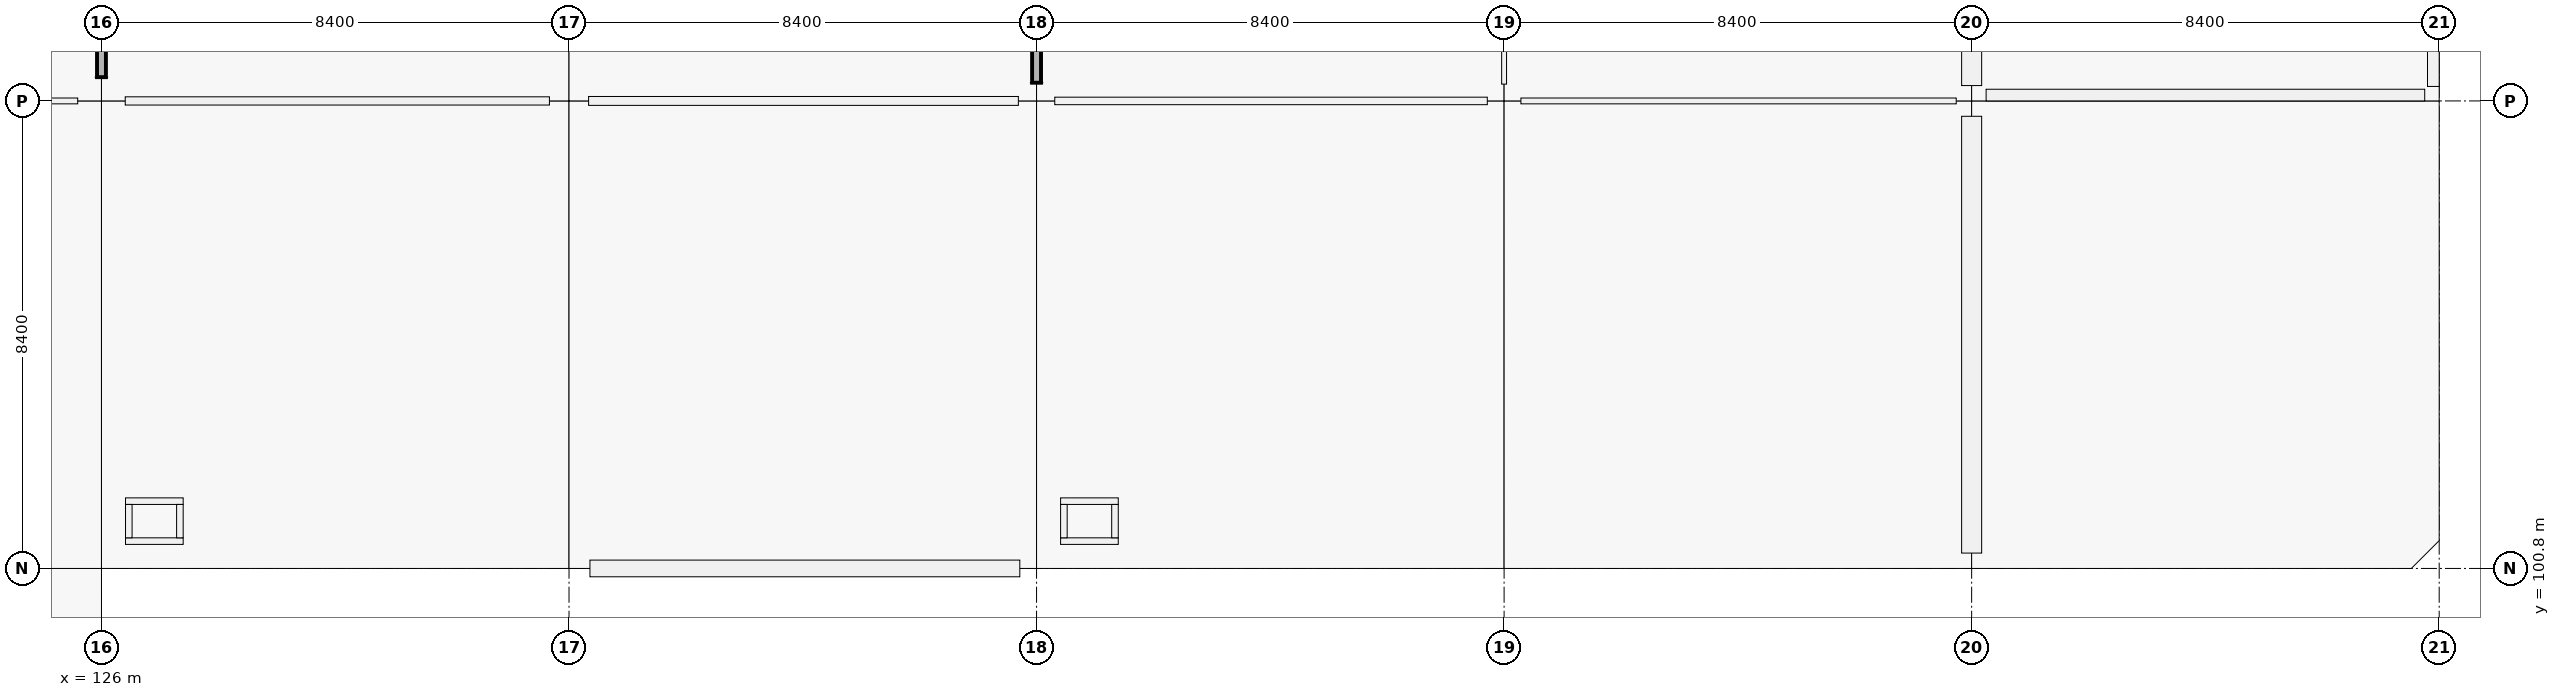
"""IFC4 building model, lengths in metres.
Left out: names, types, materials, properties, quantities, classifications, styles, units other than length and angle.
Written with IfcOpenShell. Run it as: python <this file> out.ifc"""

import sys

from ifc_helpers import new_model, si_unit, direction, frame, frame_2d, origin, origin_2d, place, context, subcontext, project, spatial, rectangle, extrude, element, fill, save


model = new_model("IFC4")
c1 = context("Model", 3, precision=1e-05, world=origin(), true_north=direction((0.0, 1.0)))
c2 = subcontext(c1, "Body", "Model", "MODEL_VIEW")
j1 = project(units=[si_unit("LENGTHUNIT", "METRE"), si_unit("PLANEANGLEUNIT", "RADIAN")], contexts=[c1])
p1 = place(None, origin())
s1 = spatial("IfcSite", under=j1, at=p1, CompositionType="ELEMENT")
p2 = place(p1, origin())
s2 = spatial("IfcBuilding", under=s1, at=p2, CompositionType="ELEMENT")
p3 = place(p2, frame((0.0, 0.0, 10.26)))
s3 = spatial("IfcBuildingStorey", under=s2, at=p3, CompositionType="ELEMENT", Elevation=10.26)
for number, where, z_axis, x_axis in (
    (1, (126.0, 100.8, 0.0), (0.0, 0.0, 1.0), (1.0, 0.0, 0.0)),
    (2, (126.0, 109.2, 0.0), (0.0, 0.0, 1.0), (1.0, 0.0, 0.0)),
):
    element("IfcColumn", number, at=place(p3, frame(where, z_axis=z_axis, x_axis=x_axis)), inside=s3, PredefinedType="COLUMN", context=c2, shape_type="SweptSolid", body=[
        extrude(rectangle(XDim=0.85, YDim=0.85, at=origin_2d()), origin(), (0.0, 0.0, 1.0), 4.5),
    ])
p4 = place(p3, frame((134.4, 100.8, 0.0), z_axis=(0.0, 0.0, 1.0), x_axis=(1.0, 0.0, 0.0)))
e3 = element("IfcColumn", 3, at=p4, inside=s3, PredefinedType="COLUMN", context=c2, shape_type="SweptSolid", body=[
    extrude(rectangle(XDim=0.75, YDim=0.75, at=origin_2d()), origin(), (0.0, 0.0, 1.0), 4.5),
])
p5 = place(p3, frame((134.4, 109.2, 0.0), z_axis=(0.0, 0.0, 1.0), x_axis=(1.0, 0.0, 0.0)))
e4 = element("IfcColumn", 4, at=p5, inside=s3, PredefinedType="COLUMN", context=c2, shape_type="SweptSolid", body=[
    extrude(rectangle(XDim=0.7, YDim=0.7, at=origin_2d()), origin(), (0.0, 0.0, 1.0), 4.5),
])
p6 = place(p3, frame((142.8, 100.8, 0.0), z_axis=(0.0, 0.0, 1.0), x_axis=(1.0, 0.0, 0.0)))
e5 = element("IfcColumn", 5, at=p6, inside=s3, PredefinedType="COLUMN", context=c2, shape_type="SweptSolid", body=[
    extrude(rectangle(XDim=0.6, YDim=0.6, at=origin_2d()), origin(), (0.0, 0.0, 1.0), 4.5),
])
for number, where, z_axis, x_axis in (
    (6, (142.8, 109.2, 0.0), (0.0, 0.0, 1.0), (1.0, 0.0, 0.0)),
    (7, (151.2, 100.8, 0.0), (0.0, 0.0, 1.0), (1.0, 0.0, 0.0)),
):
    element("IfcColumn", number, at=place(p3, frame(where, z_axis=z_axis, x_axis=x_axis)), inside=s3, PredefinedType="COLUMN", context=c2, shape_type="SweptSolid", body=[
        extrude(rectangle(XDim=0.65, YDim=0.65, at=origin_2d()), origin(), (0.0, 0.0, 1.0), 4.5),
    ])
p7 = place(p3, frame((151.2, 109.2, 0.0), z_axis=(0.0, 0.0, 1.0), x_axis=(1.0, 0.0, 0.0)))
e8 = element("IfcColumn", 8, at=p7, inside=s3, PredefinedType="COLUMN", context=c2, shape_type="SweptSolid", body=[
    extrude(rectangle(XDim=0.6, YDim=0.6, at=origin_2d()), origin(), (0.0, 0.0, 1.0), 4.5),
])
for number, where, z_axis, x_axis in (
    (9, (159.6, 100.8, 0.0), (0.0, 0.0, 1.0), (1.0, 0.0, 0.0)),
    (10, (159.6, 109.2, 0.0), (0.0, 0.0, 1.0), (1.0, 0.0, 0.0)),
):
    element("IfcColumn", number, at=place(p3, frame(where, z_axis=z_axis, x_axis=x_axis)), inside=s3, PredefinedType="COLUMN", context=c2, shape_type="SweptSolid", body=[
        extrude(rectangle(XDim=0.55, YDim=0.55, at=origin_2d()), origin(), (0.0, 0.0, 1.0), 4.25),
    ])
p8 = place(p3, frame((142.499, 100.8, 0.0), z_axis=(0.0, 0.0, 1.0), x_axis=(-1.0, 0.0, 0.0)))
e11 = element("IfcWall", 11, at=p8, inside=s3, PredefinedType="SOLIDWALL", context=c2, shape_type="SweptSolid", body=[
    extrude(rectangle(XDim=7.723, YDim=0.3, at=frame_2d((3.862, 0.0))), origin(), (0.0, 0.0, 1.0), 3.54),
])
p9 = place(p8, frame((2.486, 0.0, 0.9)))
e12 = element("IfcOpeningElement", 12, at=p9, cuts=e11, PredefinedType="OPENING", context=c2, shape_type="SweptSolid", body=[
    extrude(rectangle(XDim=2.75, YDim=1.6, at=frame_2d((1.375, 0.8))), frame((0.0, 0.15, 0.0), z_axis=(0.0, -1.0, 0.0), x_axis=(1.0, 0.0, 0.0)), (0.0, 0.0, 1.0), 0.3),
])
p10 = place(p3, frame((159.6, 108.924, 0.0), z_axis=(0.0, 0.0, 1.0), x_axis=(0.0, -1.0, 0.0)))
e13 = element("IfcWall", 13, at=p10, inside=s3, PredefinedType="SOLIDWALL", context=c2, shape_type="SweptSolid", body=[
    extrude(rectangle(XDim=7.848, YDim=0.36, at=frame_2d((3.924, 0.0))), origin(), (0.0, 0.0, 1.0), 3.54),
])
p11 = place(p10, frame((3.099, 0.0, 0.0)))
e14 = element("IfcOpeningElement", 14, at=p11, cuts=e13, PredefinedType="OPENING", context=c2, shape_type="SweptSolid", body=[
    extrude(rectangle(XDim=1.65, YDim=2.2, at=frame_2d((0.825, 1.1))), frame((0.0, 0.18, 0.0), z_axis=(0.0, -1.0, 0.0), x_axis=(1.0, 0.0, 0.0)), (0.0, 0.0, 1.0), 0.36),
])
p12 = place(p3, frame((159.6, 117.324, 0.0), z_axis=(0.0, 0.0, 1.0), x_axis=(0.0, -1.0, 0.0)))
e15 = element("IfcWall", 15, at=p12, inside=s3, PredefinedType="SOLIDWALL", context=c2, shape_type="SweptSolid", body=[
    extrude(rectangle(XDim=7.848, YDim=0.36, at=frame_2d((3.924, 0.0))), origin(), (0.0, 0.0, 1.0), 3.54),
])
p13 = place(p12, frame((3.174, 0.0, 0.9)))
e16 = element("IfcOpeningElement", 16, at=p13, cuts=e15, PredefinedType="OPENING", context=c2, shape_type="SweptSolid", body=[
    extrude(rectangle(XDim=1.5, YDim=1.8, at=frame_2d((0.75, 0.9))), frame((0.0, 0.18, 0.0), z_axis=(0.0, -1.0, 0.0), x_axis=(1.0, 0.0, 0.0)), (0.0, 0.0, 1.0), 0.36),
])
p14 = place(p3, frame((167.74, 109.305, 0.0), z_axis=(0.0, 0.0, 1.0), x_axis=(-1.0, 0.0, 0.0)))
e17 = element("IfcWall", 17, at=p14, inside=s3, PredefinedType="PARAPET", context=c2, shape_type="SweptSolid", body=[
    extrude(rectangle(XDim=7.88, YDim=0.21, at=frame_2d((3.94, 0.0))), origin(), (0.0, 0.0, 1.0), 0.95),
])
p15 = place(p3, frame((167.895, 117.34, 0.0), z_axis=(0.0, 0.0, 1.0), x_axis=(0.0, -1.0, 0.0)))
e18 = element("IfcWall", 18, at=p15, inside=s3, PredefinedType="PARAPET", context=c2, shape_type="SweptSolid", body=[
    extrude(rectangle(XDim=7.88, YDim=0.21, at=frame_2d((3.94, 0.0))), origin(), (0.0, 0.0, 1.0), 0.95),
])
for number, where, z_axis, x_axis in (
    (19, (126.432, 101.291, 0.0), (0.0, 0.0, 1.0), (1.0, 0.0, 0.0)),
    (20, (126.432, 102.009, 0.0), (0.0, 0.0, 1.0), (1.0, 0.0, 0.0)),
):
    element("IfcWall", number, at=place(p3, frame(where, z_axis=z_axis, x_axis=x_axis)), inside=s3, PredefinedType="PARTITIONING", context=c2, shape_type="SweptSolid", body=[
        extrude(rectangle(XDim=1.036, YDim=0.118, at=frame_2d((0.518, 0.0))), origin(), (0.0, 0.0, 1.0), 3.53),
    ])
for number, where, z_axis, x_axis in (
    (21, (126.491, 101.35, 0.0), (0.0, 0.0, 1.0), (0.0, 1.0, 0.0)),
    (22, (127.409, 101.35, 0.0), (0.0, 0.0, 1.0), (0.0, 1.0, 0.0)),
):
    element("IfcWall", number, at=place(p3, frame(where, z_axis=z_axis, x_axis=x_axis)), inside=s3, PredefinedType="PARTITIONING", context=c2, shape_type="SweptSolid", body=[
        extrude(rectangle(XDim=0.6, YDim=0.118, at=frame_2d((0.3, 0.0))), origin(), (0.0, 0.0, 1.0), 3.53),
    ])
for number, where, z_axis, x_axis in (
    (23, (143.232, 101.291, 0.0), (0.0, 0.0, 1.0), (1.0, 0.0, 0.0)),
    (24, (143.232, 102.009, 0.0), (0.0, 0.0, 1.0), (1.0, 0.0, 0.0)),
):
    element("IfcWall", number, at=place(p3, frame(where, z_axis=z_axis, x_axis=x_axis)), inside=s3, PredefinedType="PARTITIONING", context=c2, shape_type="SweptSolid", body=[
        extrude(rectangle(XDim=1.036, YDim=0.118, at=frame_2d((0.518, 0.0))), origin(), (0.0, 0.0, 1.0), 3.53),
    ])
for number, where, z_axis, x_axis in (
    (25, (143.291, 101.35, 0.0), (0.0, 0.0, 1.0), (0.0, 1.0, 0.0)),
    (26, (144.209, 101.35, 0.0), (0.0, 0.0, 1.0), (0.0, 1.0, 0.0)),
):
    element("IfcWall", number, at=place(p3, frame(where, z_axis=z_axis, x_axis=x_axis)), inside=s3, PredefinedType="PARTITIONING", context=c2, shape_type="SweptSolid", body=[
        extrude(rectangle(XDim=0.6, YDim=0.118, at=frame_2d((0.3, 0.0))), origin(), (0.0, 0.0, 1.0), 3.53),
    ])
p16 = place(p3, frame((118.027, 109.2, 0.0), z_axis=(0.0, 0.0, 1.0), x_axis=(1.0, 0.0, 0.0)))
e27 = element("IfcWall", 27, at=p16, inside=s3, PredefinedType="PARTITIONING", context=c2, shape_type="SweptSolid", body=[
    extrude(rectangle(XDim=7.546, YDim=0.105, at=frame_2d((3.773, 0.0))), origin(), (0.0, 0.0, 1.0), 3.37),
])
p17 = place(p16, frame((3.283, 0.0, 0.0)))
e28 = element("IfcOpeningElement", 28, at=p17, cuts=e27, PredefinedType="OPENING", context=c2, shape_type="SweptSolid", body=[
    extrude(rectangle(XDim=0.98, YDim=2.18, at=frame_2d((0.49, 1.09))), frame((0.0, 0.052, 0.0), z_axis=(0.0, -1.0, 0.0), x_axis=(1.0, 0.0, 0.0)), (0.0, 0.0, 1.0), 0.105),
])
p18 = place(p3, frame((126.427, 109.2, 0.0), z_axis=(0.0, 0.0, 1.0), x_axis=(1.0, 0.0, 0.0)))
e29 = element("IfcWall", 29, at=p18, inside=s3, PredefinedType="PARTITIONING", context=c2, shape_type="SweptSolid", body=[
    extrude(rectangle(XDim=7.621, YDim=0.148, at=frame_2d((3.811, 0.0))), origin(), (0.0, 0.0, 1.0), 3.37),
])
p19 = place(p18, frame((3.361, 0.0, 0.0)))
e30 = element("IfcOpeningElement", 30, at=p19, cuts=e29, PredefinedType="OPENING", context=c2, shape_type="SweptSolid", body=[
    extrude(rectangle(XDim=0.9, YDim=2.05, at=frame_2d((0.45, 1.025))), frame((0.0, 0.074, 0.0), z_axis=(0.0, -1.0, 0.0), x_axis=(1.0, 0.0, 0.0)), (0.0, 0.0, 1.0), 0.148),
])
p20 = place(p3, frame((134.752, 109.2, 0.0), z_axis=(0.0, 0.0, 1.0), x_axis=(1.0, 0.0, 0.0)))
e31 = element("IfcWall", 31, at=p20, inside=s3, PredefinedType="PARTITIONING", context=c2, shape_type="SweptSolid", body=[
    extrude(rectangle(XDim=7.721, YDim=0.16, at=frame_2d((3.86, 0.0))), origin(), (0.0, 0.0, 1.0), 3.37),
])
p21 = place(p20, frame((3.061, 0.0, 0.0)))
e32 = element("IfcOpeningElement", 32, at=p21, cuts=e31, PredefinedType="OPENING", context=c2, shape_type="SweptSolid", body=[
    extrude(rectangle(XDim=1.6, YDim=2.2, at=frame_2d((0.8, 1.1))), frame((0.0, 0.08, 0.0), z_axis=(0.0, -1.0, 0.0), x_axis=(1.0, 0.0, 0.0)), (0.0, 0.0, 1.0), 0.16),
])
p22 = place(p3, frame((143.127, 109.2, 0.0), z_axis=(0.0, 0.0, 1.0), x_axis=(1.0, 0.0, 0.0)))
e33 = element("IfcWall", 33, at=p22, inside=s3, PredefinedType="PARTITIONING", context=c2, shape_type="SweptSolid", body=[
    extrude(rectangle(XDim=7.771, YDim=0.135, at=frame_2d((3.885, 0.0))), origin(), (0.0, 0.0, 1.0), 3.37),
])
p23 = place(p22, frame((3.361, 0.0, 0.0)))
e34 = element("IfcOpeningElement", 34, at=p23, cuts=e33, PredefinedType="OPENING", context=c2, shape_type="SweptSolid", body=[
    extrude(rectangle(XDim=1.05, YDim=2.12, at=frame_2d((0.525, 1.06))), frame((0.0, 0.067, 0.0), z_axis=(0.0, -1.0, 0.0), x_axis=(1.0, 0.0, 0.0)), (0.0, 0.0, 1.0), 0.135),
])
p24 = place(p3, frame((151.502, 109.2, 0.0), z_axis=(0.0, 0.0, 1.0), x_axis=(1.0, 0.0, 0.0)))
e35 = element("IfcWall", 35, at=p24, inside=s3, PredefinedType="PARTITIONING", context=c2, shape_type="SweptSolid", body=[
    extrude(rectangle(XDim=7.821, YDim=0.105, at=frame_2d((3.911, 0.0))), origin(), (0.0, 0.0, 1.0), 3.37),
])
p25 = place(p24, frame((3.405, 0.0, 0.0)))
e36 = element("IfcOpeningElement", 36, at=p25, cuts=e35, PredefinedType="OPENING", context=c2, shape_type="SweptSolid", body=[
    extrude(rectangle(XDim=1.01, YDim=2.12, at=frame_2d((0.505, 1.06))), frame((0.0, 0.052, 0.0), z_axis=(0.0, -1.0, 0.0), x_axis=(1.0, 0.0, 0.0)), (0.0, 0.0, 1.0), 0.105),
])
p26 = place(p3, frame((126.0, 109.627, 0.0), z_axis=(0.0, 0.0, 1.0), x_axis=(0.0, 1.0, 0.0)))
e37 = element("IfcWall", 37, at=p26, inside=s3, PredefinedType="PARTITIONING", context=c2, shape_type="SweptSolid", body=[
    extrude(rectangle(XDim=7.696, YDim=0.16, at=frame_2d((3.848, 0.0))), origin(), (0.0, 0.0, 1.0), 3.37),
])
p27 = place(p26, frame((3.273, 0.0, 0.0)))
e38 = element("IfcOpeningElement", 38, at=p27, cuts=e37, PredefinedType="OPENING", context=c2, shape_type="SweptSolid", body=[
    extrude(rectangle(XDim=1.15, YDim=2.2, at=frame_2d((0.575, 1.1))), frame((0.0, 0.08, 0.0), z_axis=(0.0, -1.0, 0.0), x_axis=(1.0, 0.0, 0.0)), (0.0, 0.0, 1.0), 0.16),
])
p28 = place(p3, frame((142.8, 109.527, 0.0), z_axis=(0.0, 0.0, 1.0), x_axis=(0.0, 1.0, 0.0)))
e39 = element("IfcWall", 39, at=p28, inside=s3, PredefinedType="PARTITIONING", context=c2, shape_type="SweptSolid", body=[
    extrude(rectangle(XDim=7.771, YDim=0.16, at=frame_2d((3.885, 0.0))), origin(), (0.0, 0.0, 1.0), 3.37),
])
p29 = place(p28, frame((3.335, 0.0, 0.0)))
e40 = element("IfcOpeningElement", 40, at=p29, cuts=e39, PredefinedType="OPENING", context=c2, shape_type="SweptSolid", body=[
    extrude(rectangle(XDim=1.1, YDim=2.15, at=frame_2d((0.55, 1.075))), frame((0.0, 0.08, 0.0), z_axis=(0.0, -1.0, 0.0), x_axis=(1.0, 0.0, 0.0)), (0.0, 0.0, 1.0), 0.16),
])
p30 = place(p3, frame((151.2, 109.502, 0.0), z_axis=(0.0, 0.0, 1.0), x_axis=(0.0, 1.0, 0.0)))
e41 = element("IfcWall", 41, at=p30, inside=s3, PredefinedType="PARTITIONING", context=c2, shape_type="SweptSolid", body=[
    extrude(rectangle(XDim=7.771, YDim=0.088, at=frame_2d((3.885, 0.0))), origin(), (0.0, 0.0, 1.0), 3.37),
])
p31 = place(p30, frame((3.421, 0.0, 0.0)))
e42 = element("IfcOpeningElement", 42, at=p31, cuts=e41, PredefinedType="OPENING", context=c2, shape_type="SweptSolid", body=[
    extrude(rectangle(XDim=0.93, YDim=2.12, at=frame_2d((0.465, 1.06))), frame((0.0, 0.044, 0.0), z_axis=(0.0, -1.0, 0.0), x_axis=(1.0, 0.0, 0.0)), (0.0, 0.0, 1.0), 0.088),
])
p32 = place(p9, origin())
e43 = element("IfcWindow", 43, at=p32, inside=s3, PartitioningType="SINGLE_PANEL", PredefinedType="WINDOW", context=c2, shape_type="SweptSolid", body=[
    extrude(rectangle(XDim=2.75, YDim=1.6, at=frame_2d((1.375, 0.8))), frame((0.0, 0.03, 0.0), z_axis=(0.0, -1.0, 0.0), x_axis=(1.0, 0.0, 0.0)), (0.0, 0.0, 1.0), 0.06),
])
fill(e12, e43)
p33 = place(p11, origin())
e44 = element("IfcDoor", 44, at=p33, inside=s3, OperationType="DOUBLE_DOOR_SINGLE_SWING", PredefinedType="DOOR", context=c2, shape_type="SweptSolid", body=[
    extrude(rectangle(XDim=1.65, YDim=2.2, at=frame_2d((0.825, 1.1))), frame((0.0, 0.025, 0.0), z_axis=(0.0, -1.0, 0.0), x_axis=(1.0, 0.0, 0.0)), (0.0, 0.0, 1.0), 0.05),
])
fill(e14, e44)
p34 = place(p19, origin())
e45 = element("IfcDoor", 45, at=p34, inside=s3, OperationType="SINGLE_SWING_RIGHT", PredefinedType="DOOR", context=c2, shape_type="SweptSolid", body=[
    extrude(rectangle(XDim=0.9, YDim=2.05, at=frame_2d((0.45, 1.025))), frame((0.0, 0.025, 0.0), z_axis=(0.0, -1.0, 0.0), x_axis=(1.0, 0.0, 0.0)), (0.0, 0.0, 1.0), 0.05),
])
fill(e30, e45)
p35 = place(p21, origin())
e46 = element("IfcDoor", 46, at=p35, inside=s3, OperationType="DOUBLE_DOOR_SINGLE_SWING", PredefinedType="DOOR", context=c2, shape_type="SweptSolid", body=[
    extrude(rectangle(XDim=1.6, YDim=2.2, at=frame_2d((0.8, 1.1))), frame((0.0, 0.025, 0.0), z_axis=(0.0, -1.0, 0.0), x_axis=(1.0, 0.0, 0.0)), (0.0, 0.0, 1.0), 0.05),
])
fill(e32, e46)
p36 = place(p23, origin())
e47 = element("IfcDoor", 47, at=p36, inside=s3, OperationType="SINGLE_SWING_RIGHT", PredefinedType="DOOR", context=c2, shape_type="SweptSolid", body=[
    extrude(rectangle(XDim=1.05, YDim=2.12, at=frame_2d((0.525, 1.06))), frame((0.0, 0.025, 0.0), z_axis=(0.0, -1.0, 0.0), x_axis=(1.0, 0.0, 0.0)), (0.0, 0.0, 1.0), 0.05),
])
fill(e34, e47)
p37 = place(p25, origin())
e48 = element("IfcDoor", 48, at=p37, inside=s3, OperationType="SINGLE_SWING_LEFT", PredefinedType="DOOR", context=c2, shape_type="SweptSolid", body=[
    extrude(rectangle(XDim=1.01, YDim=2.12, at=frame_2d((0.505, 1.06))), frame((0.0, 0.025, 0.0), z_axis=(0.0, -1.0, 0.0), x_axis=(1.0, 0.0, 0.0)), (0.0, 0.0, 1.0), 0.05),
])
fill(e36, e48)
save(model, sys.argv[1])
